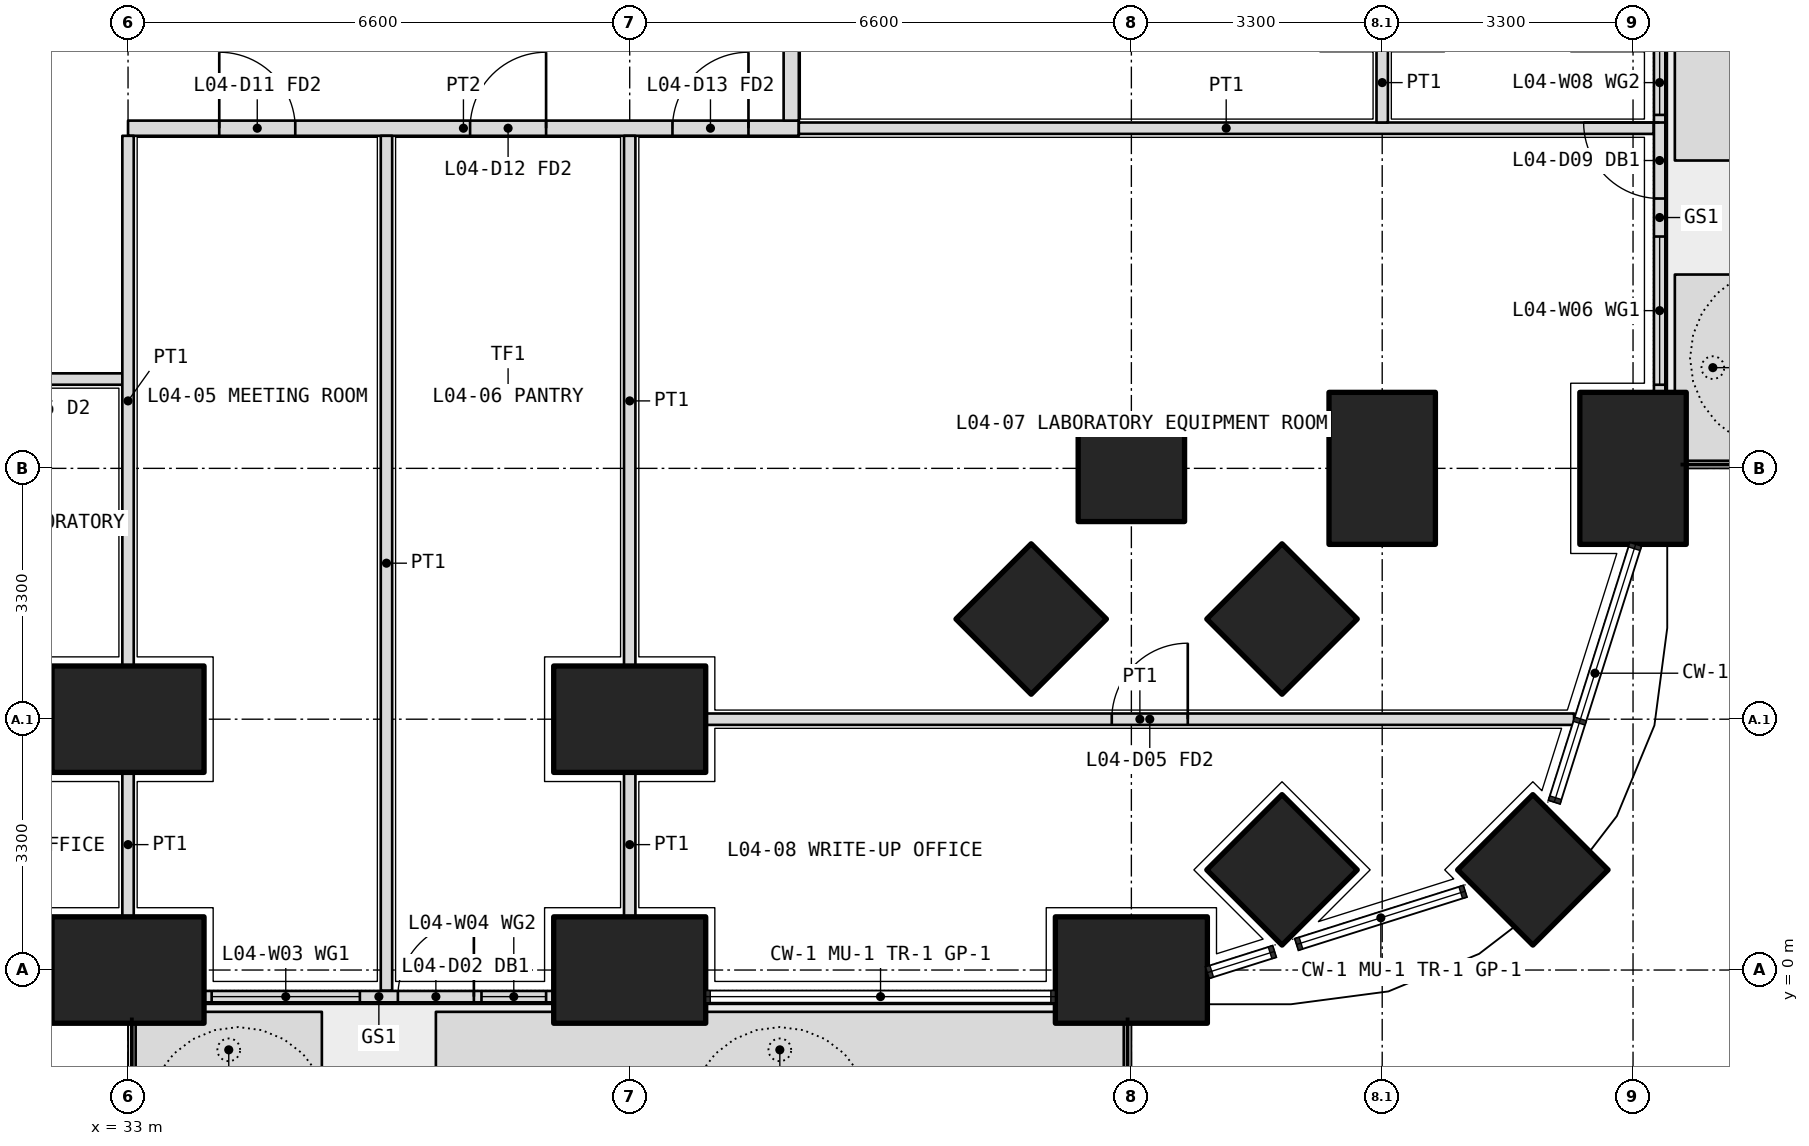
"""IFC4 building model, lengths in metres.
Left out: names, types, materials, properties, quantities, classifications, styles, units other than length and angle.
Written with IfcOpenShell. Run it as: python <this file> out.ifc"""

import sys

from ifc_helpers import new_model, si_unit, direction, frame, frame_2d, origin, origin_2d, place, context, subcontext, project, spatial, polyline, rectangle, outline, extrude, element, fill, save


model = new_model("IFC4")
c1 = context("Model", 3, precision=1e-05, world=origin(), true_north=direction((0.0, 1.0)))
c2 = subcontext(c1, "Body", "Model", "MODEL_VIEW")
j1 = project(units=[si_unit("LENGTHUNIT", "METRE"), si_unit("PLANEANGLEUNIT", "RADIAN")], contexts=[c1])
p1 = place(None, origin())
s1 = spatial("IfcSite", under=j1, at=p1, CompositionType="ELEMENT")
p2 = place(p1, origin())
s2 = spatial("IfcBuilding", under=s1, at=p2, CompositionType="ELEMENT")
p3 = place(p2, frame((0.0, 0.0, 21.3)))
s3 = spatial("IfcBuildingStorey", under=s2, at=p3, CompositionType="ELEMENT", Elevation=21.3)
p4 = place(p3, frame((51.482, 1.318, 0.0), z_axis=(0.0, 0.0, 1.0), x_axis=(0.707106781187, 0.707106781187, 0.0)))
e1 = element("IfcColumn", 1, at=p4, inside=s3, PredefinedType="COLUMN", context=c2, shape_type="SweptSolid", body=[
    extrude(rectangle(XDim=1.4, YDim=1.4, at=origin_2d()), origin(), (0.0, 0.0, 1.0), 4.2),
])
for number, where, z_axis, x_axis in (
    (2, (33.0, 0.0, 0.0), (0.0, 0.0, 1.0), (1.0, 0.0, 0.0)),
    (3, (39.6, 0.0, 0.0), (0.0, 0.0, 1.0), (1.0, 0.0, 0.0)),
    (4, (46.2, 0.0, 0.0), (0.0, 0.0, 1.0), (1.0, 0.0, 0.0)),
    (5, (52.8, 6.6, 0.0), (0.0, 0.0, 1.0), (0.0, 1.0, 0.0)),
):
    element("IfcColumn", number, at=place(p3, frame(where, z_axis=z_axis, x_axis=x_axis)), inside=s3, PredefinedType="COLUMN", context=c2, shape_type="SweptSolid", body=[
        extrude(rectangle(XDim=2.0, YDim=1.4, at=origin_2d()), origin(), (0.0, 0.0, 1.0), 4.2),
    ])
for number, where, z_axis, x_axis in (
    (6, (46.2, 6.6, 0.0), (0.0, 0.0, 1.0), (1.0, 0.0, 0.0)),
    (7, (48.182, 1.318, 0.0), (0.0, 0.0, 1.0), (0.707, 0.707, 0.0)),
):
    element("IfcColumn", number, at=place(p3, frame(where, z_axis=z_axis, x_axis=x_axis)), inside=s3, PredefinedType="COLUMN", context=c2, shape_type="SweptSolid", body=[
        extrude(rectangle(XDim=1.4, YDim=1.4, at=origin_2d()), origin(), (0.0, 0.0, 1.0), 4.2),
    ])
p5 = place(p3, frame((49.5, 6.6, 0.0), z_axis=(0.0, 0.0, 1.0), x_axis=(0.0, 1.0, 0.0)))
e8 = element("IfcColumn", 8, at=p5, inside=s3, PredefinedType="COLUMN", context=c2, shape_type="SweptSolid", body=[
    extrude(rectangle(XDim=2.0, YDim=1.4, at=origin_2d()), origin(), (0.0, 0.0, 1.0), 4.2),
])
p6 = place(p3, frame((48.182, 4.618, 0.0), z_axis=(0.0, 0.0, 1.0), x_axis=(0.707106781187, 0.707106781187, 0.0)))
e9 = element("IfcColumn", 9, at=p6, inside=s3, PredefinedType="COLUMN", context=c2, shape_type="SweptSolid", body=[
    extrude(rectangle(XDim=1.4, YDim=1.4, at=origin_2d()), origin(), (0.0, 0.0, 1.0), 4.2),
])
for number, where, z_axis, x_axis in (
    (10, (33.0, 3.3, 0.0), (0.0, 0.0, 1.0), (1.0, 0.0, 0.0)),
    (11, (39.6, 3.3, 0.0), (0.0, 0.0, 1.0), (1.0, 0.0, 0.0)),
):
    element("IfcColumn", number, at=place(p3, frame(where, z_axis=z_axis, x_axis=x_axis)), inside=s3, PredefinedType="COLUMN", context=c2, shape_type="SweptSolid", body=[
        extrude(rectangle(XDim=2.0, YDim=1.4, at=origin_2d()), origin(), (0.0, 0.0, 1.0), 4.2),
    ])
p7 = place(p3, frame((44.882, 4.618, 0.0), z_axis=(0.0, 0.0, 1.0), x_axis=(0.707106781187, 0.707106781187, 0.0)))
e12 = element("IfcColumn", 12, at=p7, inside=s3, PredefinedType="COLUMN", context=c2, shape_type="SweptSolid", body=[
    extrude(rectangle(XDim=1.4, YDim=1.4, at=origin_2d()), origin(), (0.0, 0.0, 1.0), 4.2),
])
p8 = place(p3, origin())
e13 = element("IfcWall", 13, at=p8, inside=s3, PredefinedType="USERDEFINED", context=c2, shape_type="SweptSolid", body=[
    extrude(outline(polyline([(33.1, -1.55), (35.55, -1.55), (35.55, -0.55), (33.1, -0.55), (33.1, -1.55)]), holes=[polyline([(33.25, -1.4), (35.4, -1.4), (35.4, -0.7), (33.25, -0.7), (33.25, -1.4)])]), origin(), (0.0, 0.0, 1.0), 1.05),
])
p9 = place(p3, origin())
e14 = element("IfcWall", 14, at=p9, inside=s3, PredefinedType="USERDEFINED", context=c2, shape_type="SweptSolid", body=[
    extrude(outline(polyline([(37.05, -1.55), (46.1, -1.55), (46.1, -0.55), (37.05, -0.55), (37.05, -1.55)]), holes=[polyline([(37.2, -1.4), (45.95, -1.4), (45.95, -0.7), (37.2, -0.7), (37.2, -1.4)])]), origin(), (0.0, 0.0, 1.0), 1.05),
])
p10 = place(p3, origin())
e15 = element("IfcWall", 15, at=p10, inside=s3, PredefinedType="USERDEFINED", context=c2, shape_type="SweptSolid", body=[
    extrude(outline(polyline([(53.35, 6.7), (54.35, 6.7), (54.35, 9.15), (53.35, 9.15), (53.35, 6.7)]), holes=[polyline([(53.5, 6.85), (54.2, 6.85), (54.2, 9.0), (53.5, 9.0), (53.5, 6.85)])]), origin(), (0.0, 0.0, 1.0), 1.05),
])
p11 = place(p3, origin())
e16 = element("IfcWall", 16, at=p11, inside=s3, PredefinedType="USERDEFINED", context=c2, shape_type="SweptSolid", body=[
    extrude(outline(polyline([(53.35, 10.65), (54.35, 10.65), (54.35, 19.7), (53.35, 19.7), (53.35, 10.65)]), holes=[polyline([(53.5, 10.8), (54.2, 10.8), (54.2, 19.55), (53.5, 19.55), (53.5, 10.8)])]), origin(), (0.0, 0.0, 1.0), 1.05),
])
p12 = place(p3, frame((34.0, -0.35, 0.0), z_axis=(0.0, 0.0, 1.0), x_axis=(1.0, 0.0, 0.0)))
e17 = element("IfcWall", 17, at=p12, inside=s3, PredefinedType="SOLIDWALL", context=c2, shape_type="SweptSolid", body=[
    extrude(rectangle(XDim=4.6, YDim=0.15, at=frame_2d((2.3, 0.0))), origin(), (0.0, 0.0, 1.0), 2.7),
])
p13 = place(p12, frame((2.55, 0.0, 0.0)))
e18 = element("IfcOpeningElement", 18, at=p13, cuts=e17, PredefinedType="OPENING", context=c2, shape_type="SweptSolid", body=[
    extrude(rectangle(XDim=1.0, YDim=2.4, at=frame_2d((0.5, 1.2))), frame((0.0, 0.085, 0.0), z_axis=(0.0, -1.0, 0.0), x_axis=(1.0, 0.0, 0.0)), (0.0, 0.0, 1.0), 0.17),
])
p14 = place(p12, frame((0.1, 0.0, 0.1)))
e19 = element("IfcOpeningElement", 19, at=p14, cuts=e17, PredefinedType="OPENING", context=c2, shape_type="SweptSolid", body=[
    extrude(rectangle(XDim=1.95, YDim=2.3, at=frame_2d((0.975, 1.15))), frame((0.0, 0.085, 0.0), z_axis=(0.0, -1.0, 0.0), x_axis=(1.0, 0.0, 0.0)), (0.0, 0.0, 1.0), 0.17),
])
p15 = place(p12, frame((3.65, 0.0, 0.1)))
e20 = element("IfcOpeningElement", 20, at=p15, cuts=e17, PredefinedType="OPENING", context=c2, shape_type="SweptSolid", body=[
    extrude(rectangle(XDim=0.85, YDim=2.3, at=frame_2d((0.425, 1.15))), frame((0.0, 0.085, 0.0), z_axis=(0.0, -1.0, 0.0), x_axis=(1.0, 0.0, 0.0)), (0.0, 0.0, 1.0), 0.17),
])
p16 = place(p3, frame((53.15, 7.6, 0.0), z_axis=(0.0, 0.0, 1.0), x_axis=(0.0, 1.0, 0.0)))
e21 = element("IfcWall", 21, at=p16, inside=s3, PredefinedType="SOLIDWALL", context=c2, shape_type="SweptSolid", body=[
    extrude(rectangle(XDim=4.6, YDim=0.15, at=frame_2d((2.3, 0.0))), origin(), (0.0, 0.0, 1.0), 2.7),
])
p17 = place(p16, frame((2.55, 0.0, 0.0)))
e22 = element("IfcOpeningElement", 22, at=p17, cuts=e21, PredefinedType="OPENING", context=c2, shape_type="SweptSolid", body=[
    extrude(rectangle(XDim=1.0, YDim=2.4, at=frame_2d((0.5, 1.2))), frame((0.0, 0.085, 0.0), z_axis=(0.0, -1.0, 0.0), x_axis=(1.0, 0.0, 0.0)), (0.0, 0.0, 1.0), 0.17),
])
p18 = place(p16, frame((0.1, 0.0, 0.1)))
e23 = element("IfcOpeningElement", 23, at=p18, cuts=e21, PredefinedType="OPENING", context=c2, shape_type="SweptSolid", body=[
    extrude(rectangle(XDim=1.95, YDim=2.3, at=frame_2d((0.975, 1.15))), frame((0.0, 0.085, 0.0), z_axis=(0.0, -1.0, 0.0), x_axis=(1.0, 0.0, 0.0)), (0.0, 0.0, 1.0), 0.17),
])
p19 = place(p16, frame((3.65, 0.0, 0.1)))
e24 = element("IfcOpeningElement", 24, at=p19, cuts=e21, PredefinedType="OPENING", context=c2, shape_type="SweptSolid", body=[
    extrude(rectangle(XDim=0.85, YDim=2.3, at=frame_2d((0.425, 1.15))), frame((0.0, 0.085, 0.0), z_axis=(0.0, -1.0, 0.0), x_axis=(1.0, 0.0, 0.0)), (0.0, 0.0, 1.0), 0.17),
])
p20 = place(p3, frame((33.0, 11.075, 0.0), z_axis=(0.0, 0.0, 1.0), x_axis=(1.0, 0.0, 0.0)))
e25 = element("IfcWall", 25, at=p20, inside=s3, PredefinedType="PARTITIONING", context=c2, shape_type="SweptSolid", body=[
    extrude(rectangle(XDim=8.825, YDim=0.2, at=frame_2d((4.413, 0.0))), origin(), (0.0, 0.0, 1.0), 2.85),
])
p21 = place(p20, frame((1.2, 0.0, 0.0)))
e26 = element("IfcOpeningElement", 26, at=p21, cuts=e25, PredefinedType="OPENING", context=c2, shape_type="SweptSolid", body=[
    extrude(rectangle(XDim=1.0, YDim=2.1, at=frame_2d((0.5, 1.05))), frame((0.0, 0.11, 0.0), z_axis=(0.0, -1.0, 0.0), x_axis=(1.0, 0.0, 0.0)), (0.0, 0.0, 1.0), 0.22),
])
p22 = place(p20, frame((4.5, 0.0, 0.0)))
e27 = element("IfcOpeningElement", 27, at=p22, cuts=e25, PredefinedType="OPENING", context=c2, shape_type="SweptSolid", body=[
    extrude(rectangle(XDim=1.0, YDim=2.1, at=frame_2d((0.5, 1.05))), frame((0.0, 0.11, 0.0), z_axis=(0.0, -1.0, 0.0), x_axis=(1.0, 0.0, 0.0)), (0.0, 0.0, 1.0), 0.22),
])
p23 = place(p20, frame((7.163, 0.0, 0.0)))
e28 = element("IfcOpeningElement", 28, at=p23, cuts=e25, PredefinedType="OPENING", context=c2, shape_type="SweptSolid", body=[
    extrude(rectangle(XDim=1.0, YDim=2.1, at=frame_2d((0.5, 1.05))), frame((0.0, 0.11, 0.0), z_axis=(0.0, -1.0, 0.0), x_axis=(1.0, 0.0, 0.0)), (0.0, 0.0, 1.0), 0.22),
])
p24 = place(p3, frame((41.725, 11.175, 0.0), z_axis=(0.0, 0.0, 1.0), x_axis=(0.0, 1.0, 0.0)))
e29 = element("IfcWall", 29, at=p24, inside=s3, PredefinedType="PARTITIONING", context=c2, shape_type="SweptSolid", body=[
    extrude(rectangle(XDim=23.85, YDim=0.2, at=frame_2d((11.925, 0.0))), origin(), (0.0, 0.0, 1.0), 2.85),
])
p25 = place(p24, frame((3.762, 0.0, 0.0)))
e30 = element("IfcOpeningElement", 30, at=p25, cuts=e29, PredefinedType="OPENING", context=c2, shape_type="SweptSolid", body=[
    extrude(rectangle(XDim=1.0, YDim=2.1, at=frame_2d((0.5, 1.05))), frame((0.0, 0.11, 0.0), z_axis=(0.0, -1.0, 0.0), x_axis=(1.0, 0.0, 0.0)), (0.0, 0.0, 1.0), 0.22),
])
p26 = place(p24, frame((9.625, 0.0, 0.0)))
e31 = element("IfcOpeningElement", 31, at=p26, cuts=e29, PredefinedType="OPENING", context=c2, shape_type="SweptSolid", body=[
    extrude(rectangle(XDim=1.0, YDim=2.1, at=frame_2d((0.5, 1.05))), frame((0.0, 0.11, 0.0), z_axis=(0.0, -1.0, 0.0), x_axis=(1.0, 0.0, 0.0)), (0.0, 0.0, 1.0), 0.22),
])
p27 = place(p24, frame((12.975, 0.0, 0.0)))
e32 = element("IfcOpeningElement", 32, at=p27, cuts=e29, PredefinedType="OPENING", context=c2, shape_type="SweptSolid", body=[
    extrude(rectangle(XDim=0.9, YDim=2.1, at=frame_2d((0.45, 1.05))), frame((0.0, 0.11, 0.0), z_axis=(0.0, -1.0, 0.0), x_axis=(1.0, 0.0, 0.0)), (0.0, 0.0, 1.0), 0.22),
])
p28 = place(p24, frame((18.988, 0.0, 0.0)))
e33 = element("IfcOpeningElement", 33, at=p28, cuts=e29, PredefinedType="OPENING", context=c2, shape_type="SweptSolid", body=[
    extrude(rectangle(XDim=1.2, YDim=2.1, at=frame_2d((0.6, 1.05))), frame((0.0, 0.11, 0.0), z_axis=(0.0, -1.0, 0.0), x_axis=(1.0, 0.0, 0.0)), (0.0, 0.0, 1.0), 0.22),
])
p29 = place(p3, frame((53.07, 11.075, 0.0), z_axis=(0.0, 0.0, 1.0), x_axis=(-1.0, 0.0, 0.0)))
e34 = element("IfcWall", 34, at=p29, inside=s3, PredefinedType="PARTITIONING", context=c2, shape_type="SweptSolid", body=[
    extrude(rectangle(XDim=11.245, YDim=0.15, at=frame_2d((5.623, 0.0))), origin(), (0.0, 0.0, 1.0), 2.7),
])
p30 = place(p3, frame((40.6, 3.3, 0.0), z_axis=(0.0, 0.0, 1.0), x_axis=(1.0, 0.0, 0.0)))
e35 = element("IfcWall", 35, at=p30, inside=s3, PredefinedType="PARTITIONING", context=c2, shape_type="SweptSolid", body=[
    extrude(rectangle(XDim=11.424, YDim=0.15, at=frame_2d((5.712, 0.0))), origin(), (0.0, 0.0, 1.0), 2.7),
])
p31 = place(p30, frame((5.342, 0.0, 0.0)))
e36 = element("IfcOpeningElement", 36, at=p31, cuts=e35, PredefinedType="OPENING", context=c2, shape_type="SweptSolid", body=[
    extrude(rectangle(XDim=1.0, YDim=2.1, at=frame_2d((0.5, 1.05))), frame((0.0, 0.085, 0.0), z_axis=(0.0, -1.0, 0.0), x_axis=(1.0, 0.0, 0.0)), (0.0, 0.0, 1.0), 0.17),
])
p32 = place(p3, frame((29.7, 7.775, 0.0), z_axis=(0.0, 0.0, 1.0), x_axis=(1.0, 0.0, 0.0)))
e37 = element("IfcWall", 37, at=p32, inside=s3, PredefinedType="PARTITIONING", context=c2, shape_type="SweptSolid", body=[
    extrude(rectangle(XDim=3.3, YDim=0.15, at=frame_2d((1.65, 0.0))), origin(), (0.0, 0.0, 1.0), 2.85),
])
p33 = place(p32, frame((1.05, 0.0, 0.0)))
e38 = element("IfcOpeningElement", 38, at=p33, cuts=e37, PredefinedType="OPENING", context=c2, shape_type="SweptSolid", body=[
    extrude(rectangle(XDim=1.2, YDim=2.1, at=frame_2d((0.6, 1.05))), frame((0.0, 0.085, 0.0), z_axis=(0.0, -1.0, 0.0), x_axis=(1.0, 0.0, 0.0)), (0.0, 0.0, 1.0), 0.17),
])
p34 = place(p3, frame((36.4, -0.27, 0.0), z_axis=(0.0, 0.0, 1.0), x_axis=(0.0, 1.0, 0.0)))
e39 = element("IfcWall", 39, at=p34, inside=s3, PredefinedType="PARTITIONING", context=c2, shape_type="SweptSolid", body=[
    extrude(rectangle(XDim=11.245, YDim=0.15, at=frame_2d((5.623, 0.0))), origin(), (0.0, 0.0, 1.0), 2.7),
])
p35 = place(p3, frame((39.6, 0.7, 0.0), z_axis=(0.0, 0.0, 1.0), x_axis=(0.0, 1.0, 0.0)))
e40 = element("IfcWall", 40, at=p35, inside=s3, PredefinedType="PARTITIONING", context=c2, shape_type="SweptSolid", body=[
    extrude(rectangle(XDim=1.9, YDim=0.15, at=frame_2d((0.95, 0.0))), origin(), (0.0, 0.0, 1.0), 2.85),
])
p36 = place(p3, frame((39.6, 4.0, 0.0), z_axis=(0.0, 0.0, 1.0), x_axis=(0.0, 1.0, 0.0)))
e41 = element("IfcWall", 41, at=p36, inside=s3, PredefinedType="PARTITIONING", context=c2, shape_type="SweptSolid", body=[
    extrude(rectangle(XDim=6.975, YDim=0.15, at=frame_2d((3.488, 0.0))), origin(), (0.0, 0.0, 1.0), 2.85),
])
p37 = place(p3, frame((33.0, 0.7, 0.0), z_axis=(0.0, 0.0, 1.0), x_axis=(0.0, 1.0, 0.0)))
e42 = element("IfcWall", 42, at=p37, inside=s3, PredefinedType="PARTITIONING", context=c2, shape_type="SweptSolid", body=[
    extrude(rectangle(XDim=1.9, YDim=0.15, at=frame_2d((0.95, 0.0))), origin(), (0.0, 0.0, 1.0), 2.85),
])
p38 = place(p3, frame((33.0, 4.0, 0.0), z_axis=(0.0, 0.0, 1.0), x_axis=(0.0, 1.0, 0.0)))
e43 = element("IfcWall", 43, at=p38, inside=s3, PredefinedType="PARTITIONING", context=c2, shape_type="SweptSolid", body=[
    extrude(rectangle(XDim=6.975, YDim=0.15, at=frame_2d((3.488, 0.0))), origin(), (0.0, 0.0, 1.0), 2.85),
])
p39 = place(p3, frame((49.5, 11.15, 0.0), z_axis=(0.0, 0.0, 1.0), x_axis=(0.0, 1.0, 0.0)))
e44 = element("IfcWall", 44, at=p39, inside=s3, PredefinedType="PARTITIONING", context=c2, shape_type="SweptSolid", body=[
    extrude(rectangle(XDim=1.05, YDim=0.15, at=frame_2d((0.525, 0.0))), origin(), (0.0, 0.0, 1.0), 3.9),
])
p40 = place(p13, origin())
e45 = element("IfcDoor", 45, at=p40, inside=s3, OperationType="SINGLE_SWING_RIGHT", PredefinedType="DOOR", context=c2, shape_type="SweptSolid", body=[
    extrude(rectangle(XDim=1.0, YDim=2.4, at=frame_2d((0.5, 1.2))), frame((0.0, 0.025, 0.0), z_axis=(0.0, -1.0, 0.0), x_axis=(1.0, 0.0, 0.0)), (0.0, 0.0, 1.0), 0.05),
])
fill(e18, e45)
p41 = place(p14, origin())
e46 = element("IfcWindow", 46, at=p41, inside=s3, PartitioningType="SINGLE_PANEL", PredefinedType="WINDOW", context=c2, shape_type="SweptSolid", body=[
    extrude(rectangle(XDim=1.95, YDim=2.3, at=frame_2d((0.975, 1.15))), frame((0.0, 0.03, 0.0), z_axis=(0.0, -1.0, 0.0), x_axis=(1.0, 0.0, 0.0)), (0.0, 0.0, 1.0), 0.06),
])
fill(e19, e46)
p42 = place(p15, origin())
e47 = element("IfcWindow", 47, at=p42, inside=s3, PartitioningType="SINGLE_PANEL", PredefinedType="WINDOW", context=c2, shape_type="SweptSolid", body=[
    extrude(rectangle(XDim=0.85, YDim=2.3, at=frame_2d((0.425, 1.15))), frame((0.0, 0.03, 0.0), z_axis=(0.0, -1.0, 0.0), x_axis=(1.0, 0.0, 0.0)), (0.0, 0.0, 1.0), 0.06),
])
fill(e20, e47)
p43 = place(p17, origin())
e48 = element("IfcDoor", 48, at=p43, inside=s3, OperationType="SINGLE_SWING_RIGHT", PredefinedType="DOOR", context=c2, shape_type="SweptSolid", body=[
    extrude(rectangle(XDim=1.0, YDim=2.4, at=frame_2d((0.5, 1.2))), frame((0.0, 0.025, 0.0), z_axis=(0.0, -1.0, 0.0), x_axis=(1.0, 0.0, 0.0)), (0.0, 0.0, 1.0), 0.05),
])
fill(e22, e48)
p44 = place(p18, origin())
e49 = element("IfcWindow", 49, at=p44, inside=s3, PartitioningType="SINGLE_PANEL", PredefinedType="WINDOW", context=c2, shape_type="SweptSolid", body=[
    extrude(rectangle(XDim=1.95, YDim=2.3, at=frame_2d((0.975, 1.15))), frame((0.0, 0.03, 0.0), z_axis=(0.0, -1.0, 0.0), x_axis=(1.0, 0.0, 0.0)), (0.0, 0.0, 1.0), 0.06),
])
fill(e23, e49)
p45 = place(p19, origin())
e50 = element("IfcWindow", 50, at=p45, inside=s3, PartitioningType="SINGLE_PANEL", PredefinedType="WINDOW", context=c2, shape_type="SweptSolid", body=[
    extrude(rectangle(XDim=0.85, YDim=2.3, at=frame_2d((0.425, 1.15))), frame((0.0, 0.03, 0.0), z_axis=(0.0, -1.0, 0.0), x_axis=(1.0, 0.0, 0.0)), (0.0, 0.0, 1.0), 0.06),
])
fill(e24, e50)
p46 = place(p21, origin())
e51 = element("IfcDoor", 51, at=p46, inside=s3, OperationType="SINGLE_SWING_LEFT", PredefinedType="DOOR", context=c2, shape_type="SweptSolid", body=[
    extrude(rectangle(XDim=1.0, YDim=2.1, at=frame_2d((0.5, 1.05))), frame((0.0, 0.025, 0.0), z_axis=(0.0, -1.0, 0.0), x_axis=(1.0, 0.0, 0.0)), (0.0, 0.0, 1.0), 0.05),
])
fill(e26, e51)
p47 = place(p22, origin())
e52 = element("IfcDoor", 52, at=p47, inside=s3, OperationType="SINGLE_SWING_RIGHT", PredefinedType="DOOR", context=c2, shape_type="SweptSolid", body=[
    extrude(rectangle(XDim=1.0, YDim=2.1, at=frame_2d((0.5, 1.05))), frame((0.0, 0.025, 0.0), z_axis=(0.0, -1.0, 0.0), x_axis=(1.0, 0.0, 0.0)), (0.0, 0.0, 1.0), 0.05),
])
fill(e27, e52)
p48 = place(p23, origin())
e53 = element("IfcDoor", 53, at=p48, inside=s3, OperationType="SINGLE_SWING_RIGHT", PredefinedType="DOOR", context=c2, shape_type="SweptSolid", body=[
    extrude(rectangle(XDim=1.0, YDim=2.1, at=frame_2d((0.5, 1.05))), frame((0.0, 0.025, 0.0), z_axis=(0.0, -1.0, 0.0), x_axis=(1.0, 0.0, 0.0)), (0.0, 0.0, 1.0), 0.05),
])
fill(e28, e53)
p49 = place(p31, origin())
e54 = element("IfcDoor", 54, at=p49, inside=s3, OperationType="SINGLE_SWING_RIGHT", PredefinedType="DOOR", context=c2, shape_type="SweptSolid", body=[
    extrude(rectangle(XDim=1.0, YDim=2.1, at=frame_2d((0.5, 1.05))), frame((0.0, 0.025, 0.0), z_axis=(0.0, -1.0, 0.0), x_axis=(1.0, 0.0, 0.0)), (0.0, 0.0, 1.0), 0.05),
])
fill(e36, e54)
save(model, sys.argv[1])
